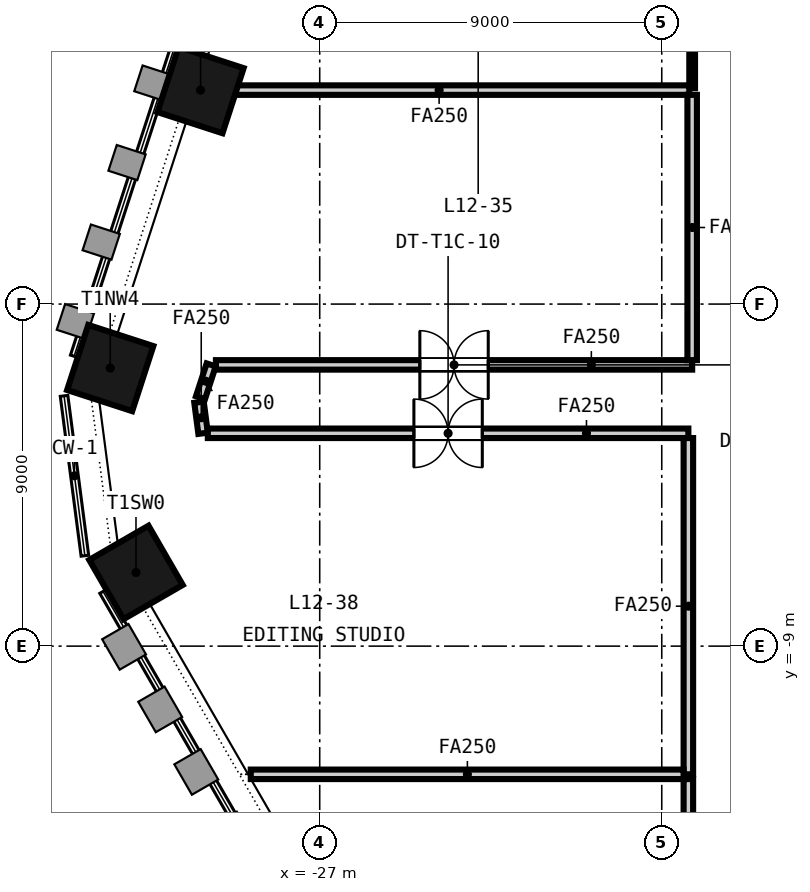
"""IFC4 building model, lengths in metres.
Left out: names, types, materials, properties, quantities, classifications, styles, units other than length and angle.
Written with IfcOpenShell. Run it as: python <this file> out.ifc"""

import sys

from ifc_helpers import new_model, si_unit, direction, frame, frame_2d, origin, origin_2d, place, context, subcontext, project, spatial, rectangle, extrude, element, fill, save


model = new_model("IFC4")
c1 = context("Model", 3, precision=1e-05, world=origin(), true_north=direction((0.0, 1.0)))
c2 = subcontext(c1, "Body", "Model", "MODEL_VIEW")
j1 = project(units=[si_unit("LENGTHUNIT", "METRE"), si_unit("PLANEANGLEUNIT", "RADIAN")], contexts=[c1])
p1 = place(None, origin())
s1 = spatial("IfcSite", under=j1, at=p1, CompositionType="ELEMENT")
p2 = place(p1, origin())
s2 = spatial("IfcBuilding", under=s1, at=p2, CompositionType="ELEMENT")
p3 = place(p2, frame((0.0, 0.0, 57.9)))
s3 = spatial("IfcBuildingStorey", under=s2, at=p3, CompositionType="ELEMENT", Elevation=57.9)
for number, where, z_axis, x_axis in (
    (1, (-30.136, 5.63, -0.15), (0.0, 0.0, 1.0), (-0.309, -0.951, 0.0)),
    (2, (-32.512, -1.683, -0.15), (0.0, 0.0, 1.0), (-0.309, -0.951, 0.0)),
    (3, (-31.834, -7.061, -0.15), (0.0, 0.0, 1.0), (0.5, -0.866, 0.0)),
):
    element("IfcColumn", number, at=place(p3, frame(where, z_axis=z_axis, x_axis=x_axis)), inside=s3, PredefinedType="COLUMN", context=c2, shape_type="SweptSolid", body=[
        extrude(rectangle(XDim=1.8, YDim=1.8, at=origin_2d()), origin(), (0.0, 0.0, 1.0), 3.65),
    ])
p4 = place(p3, frame((-30.069, -3.4, 0.0), z_axis=(0.0, 0.0, 1.0), x_axis=(-0.129642868584, 0.991560752867, 0.0)))
e4 = element("IfcWall", 4, at=p4, inside=s3, PredefinedType="PARTITIONING", context=c2, shape_type="SweptSolid", body=[
    extrude(rectangle(XDim=0.825, YDim=0.25, at=frame_2d((0.413, 0.0))), origin(), (0.0, 0.0, 1.0), 2.741),
])
p5 = place(p3, frame((-17.3, -3.4, 0.0), z_axis=(0.0, 0.0, 1.0), x_axis=(-1.0, 0.0, 0.0)))
e5 = element("IfcWall", 5, at=p5, inside=s3, PredefinedType="PARTITIONING", context=c2, shape_type="SweptSolid", body=[
    extrude(rectangle(XDim=12.644, YDim=0.25, at=frame_2d((6.322, 0.0))), origin(), (0.0, 0.0, 1.0), 2.741),
])
p6 = place(p5, frame((5.422, 0.0, 0.0)))
e6 = element("IfcOpeningElement", 6, at=p6, cuts=e5, PredefinedType="OPENING", context=c2, shape_type="SweptSolid", body=[
    extrude(rectangle(XDim=1.8, YDim=2.1, at=frame_2d((0.9, 1.05))), frame((0.0, 0.135, 0.0), z_axis=(0.0, -1.0, 0.0), x_axis=(1.0, 0.0, 0.0)), (0.0, 0.0, 1.0), 0.27),
])
p7 = place(p3, frame((-17.2, 5.68, 0.0), z_axis=(0.0, 0.0, 1.0), x_axis=(0.0, 1.0, 0.0)))
e7 = element("IfcWall", 7, at=p7, inside=s3, PredefinedType="PARTITIONING", context=c2, shape_type="SweptSolid", body=[
    extrude(rectangle(XDim=3.984, YDim=0.15, at=frame_2d((1.992, 0.0))), origin(), (0.0, 0.0, 1.0), 2.741),
])
p8 = place(p7, frame((1.467, 0.0, 0.0)))
e8 = element("IfcOpeningElement", 8, at=p8, cuts=e7, PredefinedType="OPENING", context=c2, shape_type="SweptSolid", body=[
    extrude(rectangle(XDim=1.0, YDim=2.1, at=frame_2d((0.5, 1.05))), frame((0.0, 0.085, 0.0), z_axis=(0.0, -1.0, 0.0), x_axis=(1.0, 0.0, 0.0)), (0.0, 0.0, 1.0), 0.17),
])
p9 = place(p3, frame((-30.451, 5.63, 0.0), z_axis=(0.0, 0.0, 1.0), x_axis=(1.0, 0.0, 0.0)))
e9 = element("IfcWall", 9, at=p9, inside=s3, PredefinedType="PARTITIONING", context=c2, shape_type="SweptSolid", body=[
    extrude(rectangle(XDim=13.176, YDim=0.25, at=frame_2d((6.588, 0.0))), origin(), (0.0, 0.0, 1.0), 2.741),
])
p10 = place(p3, frame((-30.137, -2.463, 0.0), z_axis=(0.0, 0.0, 1.0), x_axis=(0.309846187565, 0.950786695348, 0.0)))
e10 = element("IfcWall", 10, at=p10, inside=s3, PredefinedType="PARTITIONING", context=c2, shape_type="SweptSolid", body=[
    extrude(rectangle(XDim=0.908, YDim=0.25, at=frame_2d((0.454, 0.0))), origin(), (0.0, 0.0, 1.0), 2.741),
])
p11 = place(p3, frame((-29.731, -1.6, 0.0), z_axis=(0.0, 0.0, 1.0), x_axis=(1.0, 0.0, 0.0)))
e11 = element("IfcWall", 11, at=p11, inside=s3, PredefinedType="PARTITIONING", context=c2, shape_type="SweptSolid", body=[
    extrude(rectangle(XDim=12.531, YDim=0.25, at=frame_2d((6.266, 0.0))), origin(), (0.0, 0.0, 1.0), 2.741),
])
p12 = place(p11, frame((5.365, 0.0, 0.0)))
e12 = element("IfcOpeningElement", 12, at=p12, cuts=e11, PredefinedType="OPENING", context=c2, shape_type="SweptSolid", body=[
    extrude(rectangle(XDim=1.8, YDim=2.1, at=frame_2d((0.9, 1.05))), frame((0.0, 0.135, 0.0), z_axis=(0.0, -1.0, 0.0), x_axis=(1.0, 0.0, 0.0)), (0.0, 0.0, 1.0), 0.27),
])
p13 = place(p3, frame((-17.2, -1.475, 0.0), z_axis=(0.0, 0.0, 1.0), x_axis=(0.0, 1.0, 0.0)))
e13 = element("IfcWall", 13, at=p13, inside=s3, PredefinedType="PARTITIONING", context=c2, shape_type="SweptSolid", body=[
    extrude(rectangle(XDim=6.98, YDim=0.25, at=frame_2d((3.49, 0.0))), origin(), (0.0, 0.0, 1.0), 2.741),
])
p14 = place(p3, frame((-17.3, -12.373, 0.0), z_axis=(0.0, 0.0, 1.0), x_axis=(0.0, 1.0, 0.0)))
e14 = element("IfcWall", 14, at=p14, inside=s3, PredefinedType="PARTITIONING", context=c2, shape_type="SweptSolid", body=[
    extrude(rectangle(XDim=8.848, YDim=0.25, at=frame_2d((4.424, 0.0))), origin(), (0.0, 0.0, 1.0), 2.741),
])
p15 = place(p3, frame((-28.814, -12.373, 0.0), z_axis=(0.0, 0.0, 1.0), x_axis=(1.0, 0.0, 0.0)))
e15 = element("IfcWall", 15, at=p15, inside=s3, PredefinedType="PARTITIONING", context=c2, shape_type="SweptSolid", body=[
    extrude(rectangle(XDim=11.389, YDim=0.25, at=frame_2d((5.694, 0.0))), origin(), (0.0, 0.0, 1.0), 2.741),
])
p16 = place(p3, frame((-17.3, -20.275, 0.0), z_axis=(0.0, 0.0, 1.0), x_axis=(0.0, 1.0, 0.0)))
e16 = element("IfcWall", 16, at=p16, inside=s3, PredefinedType="PARTITIONING", context=c2, shape_type="SweptSolid", body=[
    extrude(rectangle(XDim=7.777, YDim=0.25, at=frame_2d((3.888, 0.0))), origin(), (0.0, 0.0, 1.0), 2.741),
])
p17 = place(p6, origin())
e17 = element("IfcDoor", 17, at=p17, inside=s3, OperationType="DOUBLE_DOOR_DOUBLE_SWING", PredefinedType="DOOR", context=c2, shape_type="SweptSolid", body=[
    extrude(rectangle(XDim=1.8, YDim=2.1, at=frame_2d((0.9, 1.05))), frame((0.0, 0.025, 0.0), z_axis=(0.0, -1.0, 0.0), x_axis=(1.0, 0.0, 0.0)), (0.0, 0.0, 1.0), 0.05),
])
fill(e6, e17)
p18 = place(p12, origin())
e18 = element("IfcDoor", 18, at=p18, inside=s3, OperationType="DOUBLE_DOOR_DOUBLE_SWING", PredefinedType="DOOR", context=c2, shape_type="SweptSolid", body=[
    extrude(rectangle(XDim=1.8, YDim=2.1, at=frame_2d((0.9, 1.05))), frame((0.0, 0.025, 0.0), z_axis=(0.0, -1.0, 0.0), x_axis=(1.0, 0.0, 0.0)), (0.0, 0.0, 1.0), 0.05),
])
fill(e12, e18)
save(model, sys.argv[1])
